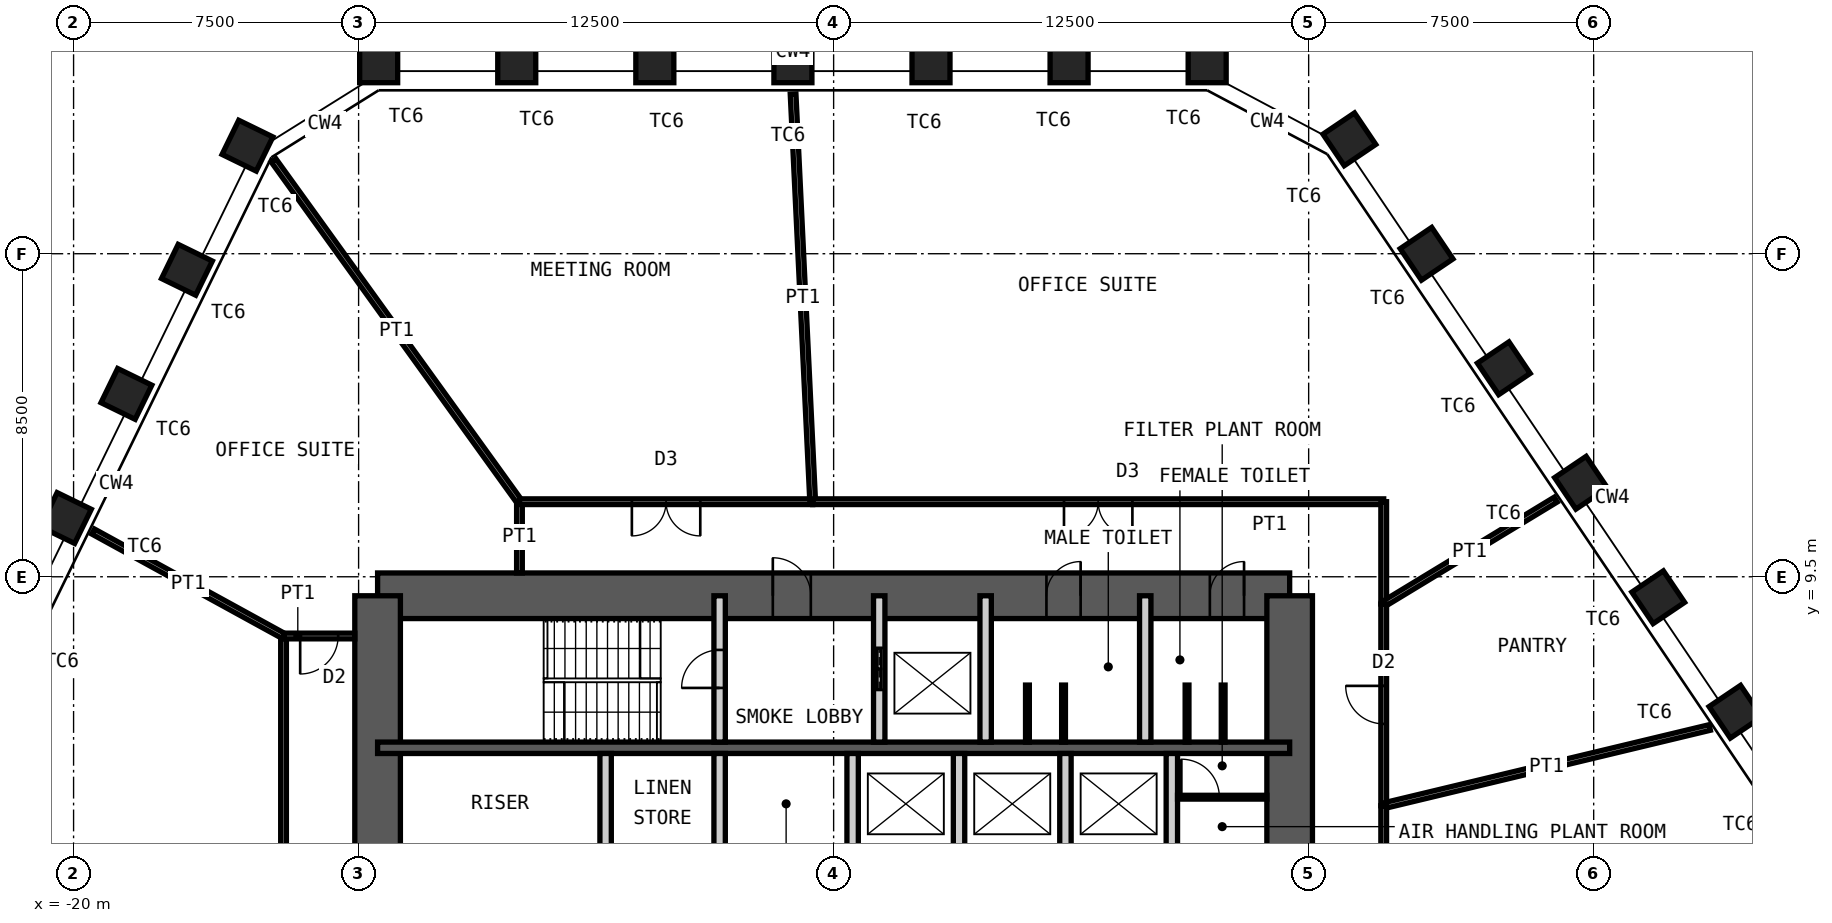
"""IFC4 building model, lengths in metres.
Left out: names, types, materials, properties, quantities, classifications, styles, units other than length and angle.
Written with IfcOpenShell. Run it as: python <this file> out.ifc"""

import sys

from ifc_helpers import new_model, si_unit, direction, frame, frame_2d, origin, origin_2d, place, context, subcontext, project, spatial, rectangle, hollow_rectangle, extrude, element, fill, save


model = new_model("IFC4")
c1 = context("Model", 3, precision=1e-05, world=origin(), true_north=direction((0.0, 1.0)))
c2 = subcontext(c1, "Body", "Model", "MODEL_VIEW")
j1 = project(units=[si_unit("LENGTHUNIT", "METRE"), si_unit("PLANEANGLEUNIT", "RADIAN")], contexts=[c1])
p1 = place(None, origin())
s1 = spatial("IfcSite", under=j1, at=p1, CompositionType="ELEMENT")
p2 = place(p1, origin())
s2 = spatial("IfcBuilding", under=s1, at=p2, CompositionType="ELEMENT")
p3 = place(p2, frame((0.0, 0.0, 230.8)))
s3 = spatial("IfcBuildingStorey", under=s2, at=p3, CompositionType="ELEMENT", Elevation=230.8)
for number, where, z_axis, x_axis in (
    (1, (-11.972, 23.0, 0.0), (0.0, 0.0, 1.0), (-1.0, 0.0, 0.0)),
    (2, (-8.338, 23.0, 0.0), (0.0, 0.0, 1.0), (-1.0, 0.0, 0.0)),
    (3, (-4.705, 23.0, 0.0), (0.0, 0.0, 1.0), (-1.0, 0.0, 0.0)),
    (4, (-1.071, 23.0, 0.0), (0.0, 0.0, 1.0), (-1.0, 0.0, 0.0)),
    (5, (2.562, 23.0, 0.0), (0.0, 0.0, 1.0), (-1.0, 0.0, 0.0)),
    (6, (6.196, 23.0, 0.0), (0.0, 0.0, 1.0), (-1.0, 0.0, 0.0)),
    (7, (9.829, 23.0, 0.0), (0.0, 0.0, 1.0), (-1.0, 0.0, 0.0)),
    (8, (13.571, 21.01, 0.0), (0.0, 0.0, 1.0), (-0.559, 0.829, 0.0)),
    (9, (15.603, 17.998, 0.0), (0.0, 0.0, 1.0), (-0.559, 0.829, 0.0)),
    (10, (17.635, 14.986, 0.0), (0.0, 0.0, 1.0), (-0.559, 0.829, 0.0)),
    (11, (19.667, 11.973, 0.0), (0.0, 0.0, 1.0), (-0.559, 0.829, 0.0)),
    (12, (21.699, 8.961, 0.0), (0.0, 0.0, 1.0), (-0.559, 0.829, 0.0)),
    (13, (23.731, 5.948, 0.0), (0.0, 0.0, 1.0), (-0.559, 0.829, 0.0)),
    (14, (-20.203, 11.045, 0.0), (0.0, 0.0, 1.0), (-0.438, -0.899, 0.0)),
    (15, (-18.61, 14.311, 0.0), (0.0, 0.0, 1.0), (-0.438, -0.899, 0.0)),
    (16, (-17.017, 17.577, 0.0), (0.0, 0.0, 1.0), (-0.438, -0.899, 0.0)),
    (17, (-15.424, 20.843, 0.0), (0.0, 0.0, 1.0), (-0.438, -0.899, 0.0)),
):
    element("IfcColumn", number, at=place(p3, frame(where, z_axis=z_axis, x_axis=x_axis)), inside=s3, PredefinedType="COLUMN", context=c2, shape_type="SweptSolid", body=[
        extrude(hollow_rectangle(XDim=1.0, YDim=1.0, WallThickness=0.06, at=origin_2d()), origin(), (0.0, 0.0, 1.0), 4.2),
    ])
p4 = place(p3, frame((-12.0, 9.0, 0.0), z_axis=(0.0, 0.0, 1.0), x_axis=(1.0, 0.0, 0.0)))
e18 = element("IfcWall", 18, at=p4, inside=s3, PredefinedType="SHEAR", context=c2, shape_type="SweptSolid", body=[
    extrude(rectangle(XDim=24.0, YDim=1.2, at=frame_2d((12.0, 0.0))), origin(), (0.0, 0.0, 1.0), 4.2),
])
p5 = place(p4, frame((10.4, 0.0, 0.0)))
e19 = element("IfcOpeningElement", 19, at=p5, cuts=e18, PredefinedType="OPENING", context=c2, shape_type="SweptSolid", body=[
    extrude(rectangle(XDim=1.0, YDim=2.1, at=frame_2d((0.5, 1.05))), frame((0.0, 0.61, 0.0), z_axis=(0.0, -1.0, 0.0), x_axis=(1.0, 0.0, 0.0)), (0.0, 0.0, 1.0), 1.22),
])
p6 = place(p4, frame((17.6, 0.0, 0.0)))
e20 = element("IfcOpeningElement", 20, at=p6, cuts=e18, PredefinedType="OPENING", context=c2, shape_type="SweptSolid", body=[
    extrude(rectangle(XDim=0.9, YDim=2.1, at=frame_2d((0.45, 1.05))), frame((0.0, 0.61, 0.0), z_axis=(0.0, -1.0, 0.0), x_axis=(1.0, 0.0, 0.0)), (0.0, 0.0, 1.0), 1.22),
])
p7 = place(p4, frame((21.9, 0.0, 0.0)))
e21 = element("IfcOpeningElement", 21, at=p7, cuts=e18, PredefinedType="OPENING", context=c2, shape_type="SweptSolid", body=[
    extrude(rectangle(XDim=0.9, YDim=2.1, at=frame_2d((0.45, 1.05))), frame((0.0, 0.61, 0.0), z_axis=(0.0, -1.0, 0.0), x_axis=(1.0, 0.0, 0.0)), (0.0, 0.0, 1.0), 1.22),
])
p8 = place(p3, frame((12.0, -9.0, 0.0), z_axis=(0.0, 0.0, 1.0), x_axis=(0.0, 1.0, 0.0)))
e22 = element("IfcWall", 22, at=p8, inside=s3, PredefinedType="SHEAR", context=c2, shape_type="SweptSolid", body=[
    extrude(rectangle(XDim=18.0, YDim=1.2, at=frame_2d((9.0, 0.0))), origin(), (0.0, 0.0, 1.0), 4.2),
])
p9 = place(p8, frame((8.1, 0.0, 0.0)))
e23 = element("IfcOpeningElement", 23, at=p9, cuts=e22, PredefinedType="OPENING", context=c2, shape_type="SweptSolid", body=[
    extrude(rectangle(XDim=1.8, YDim=2.1, at=frame_2d((0.9, 1.05))), frame((0.0, 0.61, 0.0), z_axis=(0.0, -1.0, 0.0), x_axis=(1.0, 0.0, 0.0)), (0.0, 0.0, 1.0), 1.22),
])
p10 = place(p3, frame((-12.0, -9.0, 0.0), z_axis=(0.0, 0.0, 1.0), x_axis=(0.0, 1.0, 0.0)))
e24 = element("IfcWall", 24, at=p10, inside=s3, PredefinedType="SHEAR", context=c2, shape_type="SweptSolid", body=[
    extrude(rectangle(XDim=18.0, YDim=1.2, at=frame_2d((9.0, 0.0))), origin(), (0.0, 0.0, 1.0), 4.2),
])
p11 = place(p10, frame((8.1, 0.0, 0.0)))
e25 = element("IfcOpeningElement", 25, at=p11, cuts=e24, PredefinedType="OPENING", context=c2, shape_type="SweptSolid", body=[
    extrude(rectangle(XDim=1.8, YDim=2.1, at=frame_2d((0.9, 1.05))), frame((0.0, 0.61, 0.0), z_axis=(0.0, -1.0, 0.0), x_axis=(1.0, 0.0, 0.0)), (0.0, 0.0, 1.0), 1.22),
])
p12 = place(p3, frame((-12.0, 5.0, 0.0), z_axis=(0.0, 0.0, 1.0), x_axis=(1.0, 0.0, 0.0)))
e26 = element("IfcWall", 26, at=p12, inside=s3, PredefinedType="SHEAR", context=c2, shape_type="SweptSolid", body=[
    extrude(rectangle(XDim=24.0, YDim=0.3, at=frame_2d((12.0, 0.0))), origin(), (0.0, 0.0, 1.0), 4.2),
])
p13 = place(p3, frame((-3.0, 5.15, 0.0), z_axis=(0.0, 0.0, 1.0), x_axis=(0.0, 1.0, 0.0)))
e27 = element("IfcWall", 27, at=p13, inside=s3, PredefinedType="PARTITIONING", context=c2, shape_type="SweptSolid", body=[
    extrude(rectangle(XDim=3.85, YDim=0.3, at=frame_2d((1.925, 0.0))), origin(), (0.0, 0.0, 1.0), 3.98),
])
p14 = place(p13, frame((1.425, 0.0, 0.0)))
e28 = element("IfcOpeningElement", 28, at=p14, cuts=e27, PredefinedType="OPENING", context=c2, shape_type="SweptSolid", body=[
    extrude(rectangle(XDim=1.0, YDim=2.1, at=frame_2d((0.5, 1.05))), frame((0.0, 0.16, 0.0), z_axis=(0.0, -1.0, 0.0), x_axis=(1.0, 0.0, 0.0)), (0.0, 0.0, 1.0), 0.32),
])
p15 = place(p3, frame((1.2, 5.15, 0.0), z_axis=(0.0, 0.0, 1.0), x_axis=(0.0, 1.0, 0.0)))
e29 = element("IfcWall", 29, at=p15, inside=s3, PredefinedType="PARTITIONING", context=c2, shape_type="SweptSolid", body=[
    extrude(rectangle(XDim=3.85, YDim=0.3, at=frame_2d((1.925, 0.0))), origin(), (0.0, 0.0, 1.0), 3.98),
])
p16 = place(p15, frame((1.375, 0.0, 0.0)))
e30 = element("IfcOpeningElement", 30, at=p16, cuts=e29, PredefinedType="OPENING", context=c2, shape_type="SweptSolid", body=[
    extrude(rectangle(XDim=1.1, YDim=2.4, at=frame_2d((0.55, 1.2))), frame((0.0, 0.16, 0.0), z_axis=(0.0, -1.0, 0.0), x_axis=(1.0, 0.0, 0.0)), (0.0, 0.0, 1.0), 0.32),
])
for number, where, z_axis, x_axis in (
    (31, (4.0, 5.15, 0.0), (0.0, 0.0, 1.0), (0.0, 1.0, 0.0)),
    (32, (8.2, 5.15, 0.0), (0.0, 0.0, 1.0), (0.0, 1.0, 0.0)),
):
    element("IfcWall", number, at=place(p3, frame(where, z_axis=z_axis, x_axis=x_axis)), inside=s3, PredefinedType="PARTITIONING", context=c2, shape_type="SweptSolid", body=[
        extrude(rectangle(XDim=3.85, YDim=0.3, at=frame_2d((1.925, 0.0))), origin(), (0.0, 0.0, 1.0), 3.98),
    ])
for number, where, z_axis, x_axis in (
    (33, (-6.0, 2.2, 0.0), (0.0, 0.0, 1.0), (0.0, 1.0, 0.0)),
    (34, (-3.0, 2.2, 0.0), (0.0, 0.0, 1.0), (0.0, 1.0, 0.0)),
    (35, (0.5, 2.2, 0.0), (0.0, 0.0, 1.0), (0.0, 1.0, 0.0)),
    (36, (3.3, 2.2, 0.0), (0.0, 0.0, 1.0), (0.0, 1.0, 0.0)),
    (37, (6.1, 2.2, 0.0), (0.0, 0.0, 1.0), (0.0, 1.0, 0.0)),
    (38, (8.9, 2.2, 0.0), (0.0, 0.0, 1.0), (0.0, 1.0, 0.0)),
):
    element("IfcWall", number, at=place(p3, frame(where, z_axis=z_axis, x_axis=x_axis)), inside=s3, PredefinedType="PARTITIONING", context=c2, shape_type="SweptSolid", body=[
        extrude(rectangle(XDim=2.65, YDim=0.3, at=frame_2d((1.325, 0.0))), origin(), (0.0, 0.0, 1.0), 3.98),
    ])
p17 = place(p3, frame((9.05, 3.7, 0.0), z_axis=(0.0, 0.0, 1.0), x_axis=(1.0, 0.0, 0.0)))
e39 = element("IfcWall", 39, at=p17, inside=s3, PredefinedType="PARTITIONING", context=c2, shape_type="SweptSolid", body=[
    extrude(rectangle(XDim=2.35, YDim=0.1, at=frame_2d((1.175, 0.0))), origin(), (0.0, 0.0, 1.0), 3.98),
])
p18 = place(p17, frame((0.1, 0.0, 0.0)))
e40 = element("IfcOpeningElement", 40, at=p18, cuts=e39, PredefinedType="OPENING", context=c2, shape_type="SweptSolid", body=[
    extrude(rectangle(XDim=1.0, YDim=2.4, at=frame_2d((0.5, 1.2))), frame((0.0, 0.06, 0.0), z_axis=(0.0, -1.0, 0.0), x_axis=(1.0, 0.0, 0.0)), (0.0, 0.0, 1.0), 0.12),
])
for number, where, z_axis, x_axis in (
    (41, (5.1, 5.15, 0.0), (0.0, 0.0, 1.0), (0.0, 1.0, 0.0)),
    (42, (6.05, 5.15, 0.0), (0.0, 0.0, 1.0), (0.0, 1.0, 0.0)),
    (43, (9.3, 5.15, 0.0), (0.0, 0.0, 1.0), (0.0, 1.0, 0.0)),
    (44, (10.25, 5.15, 0.0), (0.0, 0.0, 1.0), (0.0, 1.0, 0.0)),
):
    element("IfcWall", number, at=place(p3, frame(where, z_axis=z_axis, x_axis=x_axis)), inside=s3, PredefinedType="PARTITIONING", context=c2, shape_type="SweptSolid", body=[
        extrude(rectangle(XDim=1.5, YDim=0.1, at=frame_2d((0.75, 0.0))), origin(), (0.0, 0.0, 1.0), 2.1),
    ])
p19 = place(p3, frame((-14.475, -9.311, 0.0), z_axis=(0.0, 0.0, 1.0), x_axis=(0.0, 1.0, 0.0)))
e45 = element("IfcWall", 45, at=p19, inside=s3, PredefinedType="PARTITIONING", context=c2, shape_type="SweptSolid", body=[
    extrude(rectangle(XDim=17.252, YDim=0.15, at=frame_2d((8.626, 0.0))), origin(), (0.0, 0.0, 1.0), 4.03),
])
p20 = place(p19, frame((7.726, 0.0, 0.0)))
e46 = element("IfcOpeningElement", 46, at=p20, cuts=e45, PredefinedType="OPENING", context=c2, shape_type="SweptSolid", body=[
    extrude(rectangle(XDim=1.8, YDim=2.4, at=frame_2d((0.9, 1.2))), frame((0.0, 0.085, 0.0), z_axis=(0.0, -1.0, 0.0), x_axis=(1.0, 0.0, 0.0)), (0.0, 0.0, 1.0), 0.17),
])
p21 = place(p3, frame((-19.486, 10.69, 0.0), z_axis=(0.0, 0.0, 1.0), x_axis=(0.876724089264, -0.480993629172, 0.0)))
e47 = element("IfcWall", 47, at=p21, inside=s3, PredefinedType="PARTITIONING", context=c2, shape_type="SweptSolid", body=[
    extrude(rectangle(XDim=5.715, YDim=0.15, at=frame_2d((2.858, 0.0))), origin(), (0.0, 0.0, 1.0), 3.43),
])
p22 = place(p3, frame((-14.475, 7.941, 0.0), z_axis=(0.0, 0.0, 1.0), x_axis=(1.0, 0.0, 0.0)))
e48 = element("IfcWall", 48, at=p22, inside=s3, PredefinedType="PARTITIONING", context=c2, shape_type="SweptSolid", body=[
    extrude(rectangle(XDim=1.875, YDim=0.15, at=frame_2d((0.938, 0.0))), origin(), (0.0, 0.0, 1.0), 4.03),
])
p23 = place(p22, frame((0.438, 0.0, 0.0)))
e49 = element("IfcOpeningElement", 49, at=p23, cuts=e48, PredefinedType="OPENING", context=c2, shape_type="SweptSolid", body=[
    extrude(rectangle(XDim=1.0, YDim=2.4, at=frame_2d((0.5, 1.2))), frame((0.0, 0.085, 0.0), z_axis=(0.0, -1.0, 0.0), x_axis=(1.0, 0.0, 0.0)), (0.0, 0.0, 1.0), 0.17),
])
p24 = place(p3, frame((-8.267, 9.6, 0.0), z_axis=(0.0, 0.0, 1.0), x_axis=(0.0, 1.0, 0.0)))
e50 = element("IfcWall", 50, at=p24, inside=s3, PredefinedType="PARTITIONING", context=c2, shape_type="SweptSolid", body=[
    extrude(rectangle(XDim=1.875, YDim=0.15, at=frame_2d((0.938, 0.0))), origin(), (0.0, 0.0, 1.0), 4.03),
])
p25 = place(p3, frame((-14.737, 20.455, 0.0), z_axis=(0.0, 0.0, 1.0), x_axis=(0.584547025688, -0.811359830629, 0.0)))
e51 = element("IfcWall", 51, at=p25, inside=s3, PredefinedType="PARTITIONING", context=c2, shape_type="SweptSolid", body=[
    extrude(rectangle(XDim=11.068, YDim=0.15, at=frame_2d((5.534, 0.0))), origin(), (0.0, 0.0, 1.0), 2.93),
])
p26 = place(p3, frame((-8.267, 11.475, 0.0), z_axis=(0.0, 0.0, 1.0), x_axis=(1.0, 0.0, 0.0)))
e52 = element("IfcWall", 52, at=p26, inside=s3, PredefinedType="PARTITIONING", context=c2, shape_type="SweptSolid", body=[
    extrude(rectangle(XDim=7.716, YDim=0.15, at=frame_2d((3.858, 0.0))), origin(), (0.0, 0.0, 1.0), 4.03),
])
p27 = place(p26, frame((2.958, 0.0, 0.0)))
e53 = element("IfcOpeningElement", 53, at=p27, cuts=e52, PredefinedType="OPENING", context=c2, shape_type="SweptSolid", body=[
    extrude(rectangle(XDim=1.8, YDim=2.4, at=frame_2d((0.9, 1.2))), frame((0.0, 0.085, 0.0), z_axis=(0.0, -1.0, 0.0), x_axis=(1.0, 0.0, 0.0)), (0.0, 0.0, 1.0), 0.17),
])
p28 = place(p3, frame((-1.067, 22.2, 0.0), z_axis=(0.0, 0.0, 1.0), x_axis=(0.047998335863, -0.998847415652, 0.0)))
e54 = element("IfcWall", 54, at=p28, inside=s3, PredefinedType="PARTITIONING", context=c2, shape_type="SweptSolid", body=[
    extrude(rectangle(XDim=10.738, YDim=0.15, at=frame_2d((5.369, 0.0))), origin(), (0.0, 0.0, 1.0), 3.43),
])
p29 = place(p3, frame((-0.551, 11.475, 0.0), z_axis=(0.0, 0.0, 1.0), x_axis=(1.0, 0.0, 0.0)))
e55 = element("IfcWall", 55, at=p29, inside=s3, PredefinedType="PARTITIONING", context=c2, shape_type="SweptSolid", body=[
    extrude(rectangle(XDim=15.026, YDim=0.15, at=frame_2d((7.513, 0.0))), origin(), (0.0, 0.0, 1.0), 4.03),
])
p30 = place(p29, frame((6.613, 0.0, 0.0)))
e56 = element("IfcOpeningElement", 56, at=p30, cuts=e55, PredefinedType="OPENING", context=c2, shape_type="SweptSolid", body=[
    extrude(rectangle(XDim=1.8, YDim=2.4, at=frame_2d((0.9, 1.2))), frame((0.0, 0.085, 0.0), z_axis=(0.0, -1.0, 0.0), x_axis=(1.0, 0.0, 0.0)), (0.0, 0.0, 1.0), 0.17),
])
p31 = place(p3, frame((14.475, 11.475, 0.0), z_axis=(0.0, 0.0, 1.0), x_axis=(0.0, -1.0, 0.0)))
e57 = element("IfcWall", 57, at=p31, inside=s3, PredefinedType="PARTITIONING", context=c2, shape_type="SweptSolid", body=[
    extrude(rectangle(XDim=2.692, YDim=0.15, at=frame_2d((1.346, 0.0))), origin(), (0.0, 0.0, 1.0), 4.03),
])
p32 = place(p3, frame((19.001, 11.53, 0.0), z_axis=(0.0, 0.0, 1.0), x_axis=(-0.854906581035, -0.518781975114, 0.0)))
e58 = element("IfcWall", 58, at=p32, inside=s3, PredefinedType="PARTITIONING", context=c2, shape_type="SweptSolid", body=[
    extrude(rectangle(XDim=5.294, YDim=0.15, at=frame_2d((2.647, 0.0))), origin(), (0.0, 0.0, 1.0), 3.43),
])
p33 = place(p3, frame((14.475, 8.783, 0.0), z_axis=(0.0, 0.0, 1.0), x_axis=(0.0, -1.0, 0.0)))
e59 = element("IfcWall", 59, at=p33, inside=s3, PredefinedType="PARTITIONING", context=c2, shape_type="SweptSolid", body=[
    extrude(rectangle(XDim=5.309, YDim=0.15, at=frame_2d((2.654, 0.0))), origin(), (0.0, 0.0, 1.0), 4.03),
])
p34 = place(p33, frame((2.154, 0.0, 0.0)))
e60 = element("IfcOpeningElement", 60, at=p34, cuts=e59, PredefinedType="OPENING", context=c2, shape_type="SweptSolid", body=[
    extrude(rectangle(XDim=1.0, YDim=2.4, at=frame_2d((0.5, 1.2))), frame((0.0, 0.085, 0.0), z_axis=(0.0, -1.0, 0.0), x_axis=(1.0, 0.0, 0.0)), (0.0, 0.0, 1.0), 0.17),
])
p35 = place(p3, frame((23.053, 5.534, 0.0), z_axis=(0.0, 0.0, 1.0), x_axis=(-0.972377252501, -0.233414821335, 0.0)))
e61 = element("IfcWall", 61, at=p35, inside=s3, PredefinedType="PARTITIONING", context=c2, shape_type="SweptSolid", body=[
    extrude(rectangle(XDim=8.822, YDim=0.15, at=frame_2d((4.411, 0.0))), origin(), (0.0, 0.0, 1.0), 3.43),
])
p36 = place(p3, frame((14.475, 3.475, 0.0), z_axis=(0.0, 0.0, 1.0), x_axis=(0.0, -1.0, 0.0)))
e62 = element("IfcWall", 62, at=p36, inside=s3, PredefinedType="PARTITIONING", context=c2, shape_type="SweptSolid", body=[
    extrude(rectangle(XDim=5.896, YDim=0.15, at=frame_2d((2.948, 0.0))), origin(), (0.0, 0.0, 1.0), 4.03),
])
p37 = place(p36, frame((2.448, 0.0, 0.0)))
e63 = element("IfcOpeningElement", 63, at=p37, cuts=e62, PredefinedType="OPENING", context=c2, shape_type="SweptSolid", body=[
    extrude(rectangle(XDim=1.0, YDim=2.4, at=frame_2d((0.5, 1.2))), frame((0.0, 0.085, 0.0), z_axis=(0.0, -1.0, 0.0), x_axis=(1.0, 0.0, 0.0)), (0.0, 0.0, 1.0), 0.17),
])
p38 = place(p5, origin())
e64 = element("IfcDoor", 64, at=p38, inside=s3, OperationType="SINGLE_SWING_RIGHT", PredefinedType="DOOR", context=c2, shape_type="SweptSolid", body=[
    extrude(rectangle(XDim=1.0, YDim=2.1, at=frame_2d((0.5, 1.05))), frame((0.0, 0.025, 0.0), z_axis=(0.0, -1.0, 0.0), x_axis=(1.0, 0.0, 0.0)), (0.0, 0.0, 1.0), 0.05),
])
fill(e19, e64)
p39 = place(p6, origin())
e65 = element("IfcDoor", 65, at=p39, inside=s3, OperationType="SINGLE_SWING_LEFT", PredefinedType="DOOR", context=c2, shape_type="SweptSolid", body=[
    extrude(rectangle(XDim=0.9, YDim=2.1, at=frame_2d((0.45, 1.05))), frame((0.0, 0.025, 0.0), z_axis=(0.0, -1.0, 0.0), x_axis=(1.0, 0.0, 0.0)), (0.0, 0.0, 1.0), 0.05),
])
fill(e20, e65)
p40 = place(p7, origin())
e66 = element("IfcDoor", 66, at=p40, inside=s3, OperationType="SINGLE_SWING_LEFT", PredefinedType="DOOR", context=c2, shape_type="SweptSolid", body=[
    extrude(rectangle(XDim=0.9, YDim=2.1, at=frame_2d((0.45, 1.05))), frame((0.0, 0.025, 0.0), z_axis=(0.0, -1.0, 0.0), x_axis=(1.0, 0.0, 0.0)), (0.0, 0.0, 1.0), 0.05),
])
fill(e21, e66)
p41 = place(p14, origin())
e67 = element("IfcDoor", 67, at=p41, inside=s3, OperationType="SINGLE_SWING_RIGHT", PredefinedType="DOOR", context=c2, shape_type="SweptSolid", body=[
    extrude(rectangle(XDim=1.0, YDim=2.1, at=frame_2d((0.5, 1.05))), frame((0.0, 0.025, 0.0), z_axis=(0.0, -1.0, 0.0), x_axis=(1.0, 0.0, 0.0)), (0.0, 0.0, 1.0), 0.05),
])
fill(e28, e67)
p42 = place(p16, origin())
e68 = element("IfcDoor", 68, at=p42, inside=s3, OperationType="DOUBLE_DOOR_SLIDING", PredefinedType="DOOR", context=c2, shape_type="SweptSolid", body=[
    extrude(rectangle(XDim=1.1, YDim=2.4, at=frame_2d((0.55, 1.2))), frame((0.0, 0.025, 0.0), z_axis=(0.0, -1.0, 0.0), x_axis=(1.0, 0.0, 0.0)), (0.0, 0.0, 1.0), 0.05),
])
fill(e30, e68)
p43 = place(p18, origin())
e69 = element("IfcDoor", 69, at=p43, inside=s3, OperationType="SINGLE_SWING_RIGHT", PredefinedType="DOOR", context=c2, shape_type="SweptSolid", body=[
    extrude(rectangle(XDim=1.0, YDim=2.4, at=frame_2d((0.5, 1.2))), frame((0.0, 0.025, 0.0), z_axis=(0.0, -1.0, 0.0), x_axis=(1.0, 0.0, 0.0)), (0.0, 0.0, 1.0), 0.05),
])
fill(e40, e69)
p44 = place(p23, origin())
e70 = element("IfcDoor", 70, at=p44, inside=s3, OperationType="SINGLE_SWING_LEFT", PredefinedType="DOOR", context=c2, shape_type="SweptSolid", body=[
    extrude(rectangle(XDim=1.0, YDim=2.4, at=frame_2d((0.5, 1.2))), frame((0.0, 0.025, 0.0), z_axis=(0.0, -1.0, 0.0), x_axis=(1.0, 0.0, 0.0)), (0.0, 0.0, 1.0), 0.05),
])
fill(e49, e70)
p45 = place(p27, origin())
e71 = element("IfcDoor", 71, at=p45, inside=s3, OperationType="DOUBLE_DOOR_DOUBLE_SWING", PredefinedType="DOOR", context=c2, shape_type="SweptSolid", body=[
    extrude(rectangle(XDim=1.8, YDim=2.4, at=frame_2d((0.9, 1.2))), frame((0.0, 0.025, 0.0), z_axis=(0.0, -1.0, 0.0), x_axis=(1.0, 0.0, 0.0)), (0.0, 0.0, 1.0), 0.05),
])
fill(e53, e71)
p46 = place(p30, origin())
e72 = element("IfcDoor", 72, at=p46, inside=s3, OperationType="DOUBLE_DOOR_DOUBLE_SWING", PredefinedType="DOOR", context=c2, shape_type="SweptSolid", body=[
    extrude(rectangle(XDim=1.8, YDim=2.4, at=frame_2d((0.9, 1.2))), frame((0.0, 0.025, 0.0), z_axis=(0.0, -1.0, 0.0), x_axis=(1.0, 0.0, 0.0)), (0.0, 0.0, 1.0), 0.05),
])
fill(e56, e72)
p47 = place(p34, origin())
e73 = element("IfcDoor", 73, at=p47, inside=s3, OperationType="SINGLE_SWING_LEFT", PredefinedType="DOOR", context=c2, shape_type="SweptSolid", body=[
    extrude(rectangle(XDim=1.0, YDim=2.4, at=frame_2d((0.5, 1.2))), frame((0.0, 0.025, 0.0), z_axis=(0.0, -1.0, 0.0), x_axis=(1.0, 0.0, 0.0)), (0.0, 0.0, 1.0), 0.05),
])
fill(e60, e73)
save(model, sys.argv[1])
